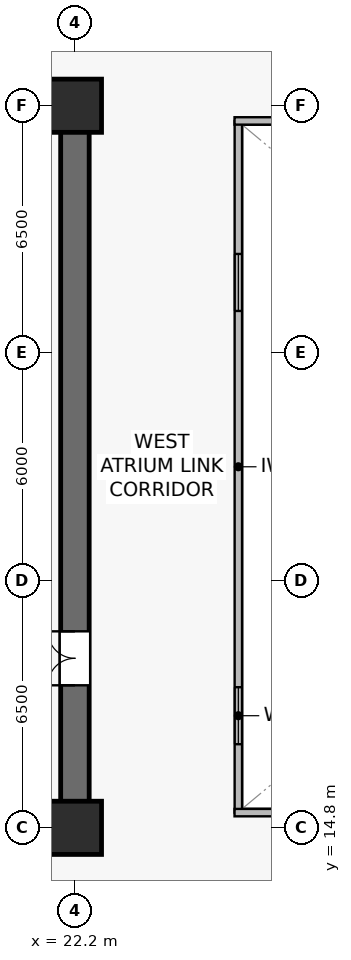
"""IFC4 building model, lengths in metres.
Left out: names, types, materials, properties, quantities, classifications, styles, units other than length and angle.
Written with IfcOpenShell. Run it as: python <this file> out.ifc"""

import sys

from ifc_helpers import new_model, si_unit, direction, frame, frame_2d, origin, origin_2d, place, context, subcontext, project, spatial, rectangle, extrude, source, transform, mapped, element, fill, save


model = new_model("IFC4")
c1 = context("Model", 3, precision=1e-05, world=origin(), true_north=direction((0.0, 1.0)))
c2 = subcontext(c1, "Body", "Model", "MODEL_VIEW")
j1 = project(units=[si_unit("LENGTHUNIT", "METRE"), si_unit("PLANEANGLEUNIT", "RADIAN")], contexts=[c1])
p1 = place(None, origin())
s1 = spatial("IfcSite", under=j1, at=p1, CompositionType="ELEMENT")
p2 = place(p1, origin())
s2 = spatial("IfcBuilding", under=s1, at=p2, CompositionType="ELEMENT")
p3 = place(p2, frame((0.0, 0.0, 41.6)))
s3 = spatial("IfcBuildingStorey", under=s2, at=p3, CompositionType="ELEMENT", Elevation=41.6)
p4 = place(p3, frame((7.025, 14.8, 0.0), z_axis=(0.0, 0.0, 1.0), x_axis=(1.0, 0.0, 0.0)))
e1 = element("IfcWall", 1, at=p4, inside=s3, PredefinedType="SHEAR", context=c2, shape_type="SweptSolid", body=[
    extrude(rectangle(XDim=15.55, YDim=0.75, at=frame_2d((7.775, 0.0))), origin(), (0.0, 0.0, 1.0), 3.78),
])
p5 = place(p3, frame((7.025, 33.8, 0.0), z_axis=(0.0, 0.0, 1.0), x_axis=(1.0, 0.0, 0.0)))
e2 = element("IfcWall", 2, at=p5, inside=s3, PredefinedType="SHEAR", context=c2, shape_type="SweptSolid", body=[
    extrude(rectangle(XDim=15.55, YDim=0.75, at=frame_2d((7.775, 0.0))), origin(), (0.0, 0.0, 1.0), 3.78),
])
p6 = place(p5, frame((6.875, 0.0, 0.0)))
e3 = element("IfcOpeningElement", 3, at=p6, cuts=e2, PredefinedType="OPENING", context=c2, shape_type="SweptSolid", body=[
    extrude(rectangle(XDim=0.95, YDim=2.15, at=frame_2d((0.475, 1.075))), frame((0.0, 0.385, 0.0), z_axis=(0.0, -1.0, 0.0), x_axis=(1.0, 0.0, 0.0)), (0.0, 0.0, 1.0), 0.77),
])
p7 = place(p5, frame((11.94, 0.0, 0.0)))
e4 = element("IfcOpeningElement", 4, at=p7, cuts=e2, PredefinedType="OPENING", context=c2, shape_type="SweptSolid", body=[
    extrude(rectangle(XDim=0.95, YDim=2.15, at=frame_2d((0.475, 1.075))), frame((0.0, 0.385, 0.0), z_axis=(0.0, -1.0, 0.0), x_axis=(1.0, 0.0, 0.0)), (0.0, 0.0, 1.0), 0.77),
])
p8 = place(p3, frame((22.2, 15.175, 0.0), z_axis=(0.0, 0.0, 1.0), x_axis=(0.0, 1.0, 0.0)))
e5 = element("IfcWall", 5, at=p8, inside=s3, PredefinedType="SHEAR", context=c2, shape_type="SweptSolid", body=[
    extrude(rectangle(XDim=18.25, YDim=0.75, at=frame_2d((9.125, 0.0))), origin(), (0.0, 0.0, 1.0), 3.78),
])
p9 = place(p8, frame((3.375, 0.0, 0.0)))
e6 = element("IfcOpeningElement", 6, at=p9, cuts=e5, PredefinedType="OPENING", context=c2, shape_type="SweptSolid", body=[
    extrude(rectangle(XDim=1.42, YDim=2.2, at=frame_2d((0.71, 1.1))), frame((0.0, 0.385, 0.0), z_axis=(0.0, -1.0, 0.0), x_axis=(1.0, 0.0, 0.0)), (0.0, 0.0, 1.0), 0.77),
])
m1 = source(origin(), c2, "Body", "SweptSolid", [
    extrude(rectangle(XDim=1.4, YDim=1.4, at=origin_2d()), origin(), (0.0, 0.0, 1.0), 4.1),
])
for number, where, z_axis, x_axis in (
    (7, (22.2, 14.8, 0.0), (0.0, 0.0, 1.0), (1.0, 0.0, 0.0)),
    (8, (22.2, 33.8, 0.0), (0.0, 0.0, 1.0), (1.0, 0.0, 0.0)),
):
    element("IfcColumn", number, at=place(p3, frame(where, z_axis=z_axis, x_axis=x_axis)), inside=s3, PredefinedType="COLUMN", context=c2, shape_type="MappedRepresentation", body=[
        mapped(m1, transform((0.0, 0.0, 0.0), scale=1.0)),
    ])
p10 = place(p3, frame((26.5, 15.2, 0.0), z_axis=(0.0, 0.0, 1.0), x_axis=(0.0, 1.0, 0.0)))
e9 = element("IfcWall", 9, at=p10, inside=s3, PredefinedType="SOLIDWALL", context=c2, shape_type="SweptSolid", body=[
    extrude(rectangle(XDim=18.2, YDim=0.195, at=frame_2d((9.1, 0.0))), origin(), (0.0, 0.0, 1.0), 3.78),
])
p11 = place(p10, frame((1.8, 0.0, 0.9)))
e10 = element("IfcOpeningElement", 10, at=p11, cuts=e9, PredefinedType="OPENING", context=c2, shape_type="SweptSolid", body=[
    extrude(rectangle(XDim=1.5, YDim=1.4, at=frame_2d((0.75, 0.7))), frame((0.0, 0.107, 0.0), z_axis=(0.0, -1.0, 0.0), x_axis=(1.0, 0.0, 0.0)), (0.0, 0.0, 1.0), 0.215),
])
p12 = place(p10, frame((13.2, 0.0, 0.9)))
e11 = element("IfcOpeningElement", 11, at=p12, cuts=e9, PredefinedType="OPENING", context=c2, shape_type="SweptSolid", body=[
    extrude(rectangle(XDim=1.5, YDim=1.4, at=frame_2d((0.75, 0.7))), frame((0.0, 0.107, 0.0), z_axis=(0.0, -1.0, 0.0), x_axis=(1.0, 0.0, 0.0)), (0.0, 0.0, 1.0), 0.215),
])
for number, where, z_axis, x_axis in (
    (12, (26.4, 15.2, 0.0), (0.0, 0.0, 1.0), (1.0, 0.0, 0.0)),
    (13, (26.4, 33.4, 0.0), (0.0, 0.0, 1.0), (1.0, 0.0, 0.0)),
):
    element("IfcWall", number, at=place(p3, frame(where, z_axis=z_axis, x_axis=x_axis)), inside=s3, PredefinedType="SOLIDWALL", context=c2, shape_type="SweptSolid", body=[
        extrude(rectangle(XDim=22.0, YDim=0.195, at=frame_2d((11.0, 0.0))), origin(), (0.0, 0.0, 1.0), 3.78),
    ])
m2 = source(origin(), c2, "Body", "SweptSolid", [
    extrude(rectangle(XDim=1.5, YDim=1.4, at=frame_2d((0.75, 0.7))), frame((0.0, 0.03, 0.0), z_axis=(0.0, -1.0, 0.0), x_axis=(1.0, 0.0, 0.0)), (0.0, 0.0, 1.0), 0.06),
])
p13 = place(p11, origin())
e14 = element("IfcWindow", 14, at=p13, inside=s3, PartitioningType="SINGLE_PANEL", PredefinedType="WINDOW", context=c2, shape_type="MappedRepresentation", body=[
    mapped(m2, transform((0.0, 0.0, 0.0), scale=1.0)),
])
fill(e10, e14)
p14 = place(p12, origin())
e15 = element("IfcWindow", 15, at=p14, inside=s3, PartitioningType="SINGLE_PANEL", PredefinedType="WINDOW", context=c2, shape_type="MappedRepresentation", body=[
    mapped(m2, transform((0.0, 0.0, 0.0), scale=1.0)),
])
fill(e11, e15)
m3 = source(origin(), c2, "Body", "SweptSolid", [
    extrude(rectangle(XDim=1.42, YDim=2.2, at=frame_2d((0.71, 1.1))), frame((0.0, 0.025, 0.0), z_axis=(0.0, -1.0, 0.0), x_axis=(1.0, 0.0, 0.0)), (0.0, 0.0, 1.0), 0.05),
])
p15 = place(p9, origin())
e16 = element("IfcDoor", 16, at=p15, inside=s3, OperationType="DOUBLE_DOOR_SINGLE_SWING", PredefinedType="DOOR", context=c2, shape_type="MappedRepresentation", body=[
    mapped(m3, transform((0.0, 0.0, 0.0), scale=1.0)),
])
fill(e6, e16)
save(model, sys.argv[1])
